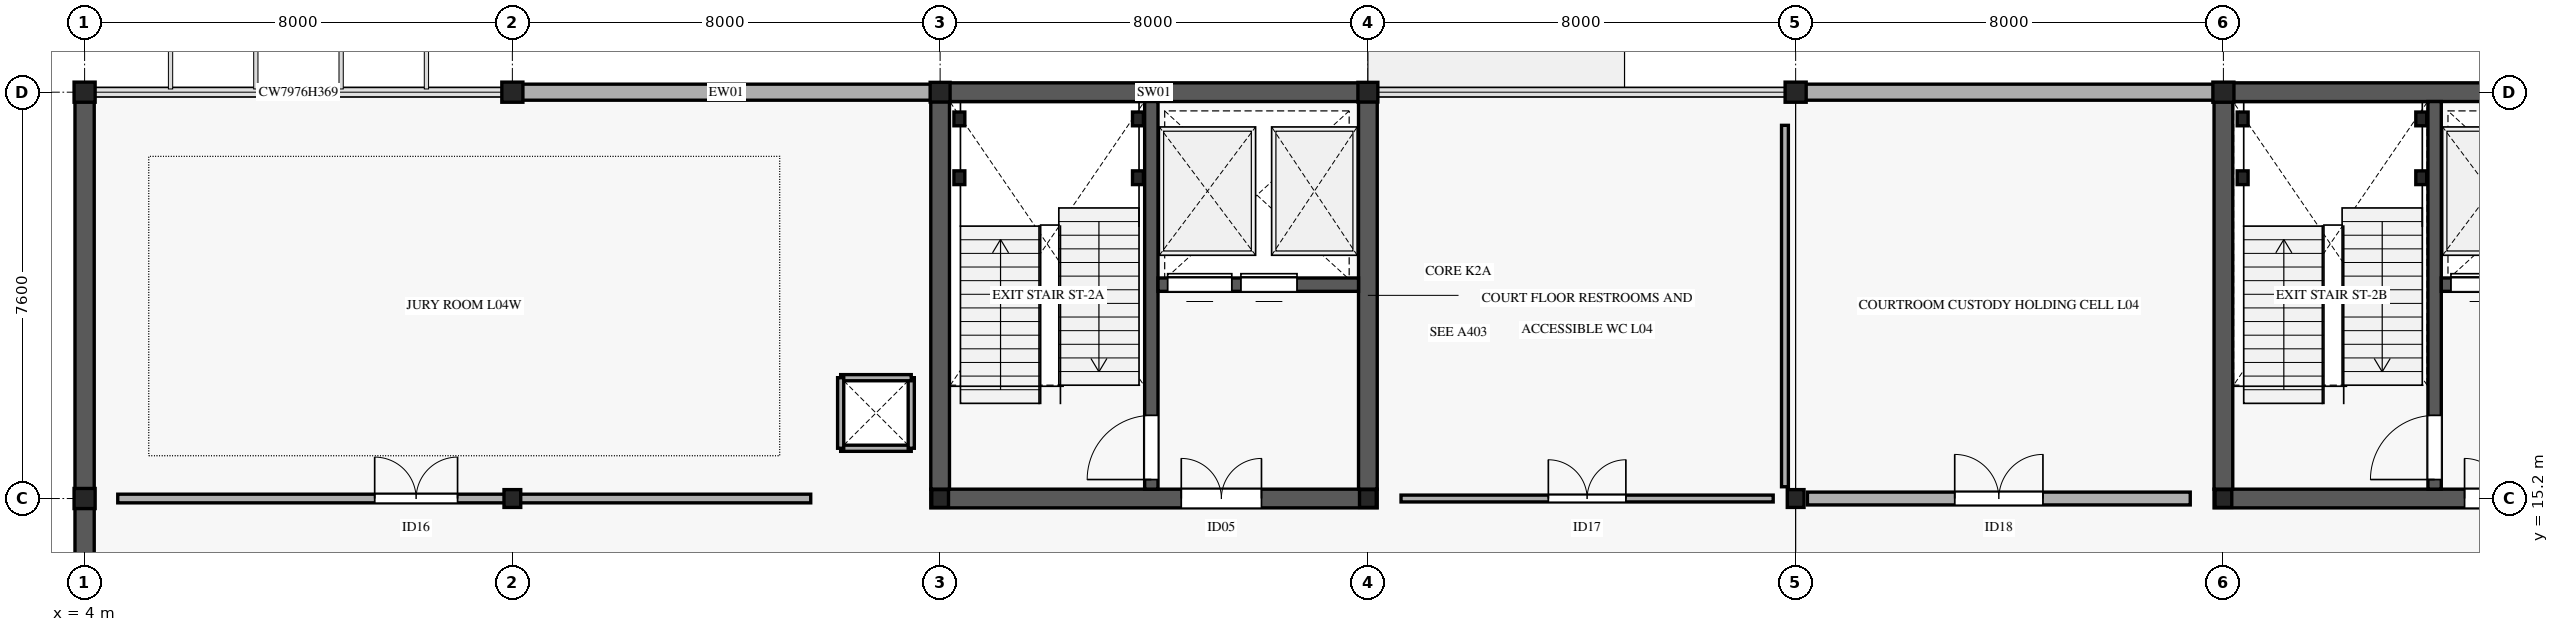
"""IFC4 building model, lengths in metres.
Left out: names, types, materials, properties, quantities, classifications, styles, units other than length and angle.
Written with IfcOpenShell. Run it as: python <this file> out.ifc"""

import sys

from ifc_helpers import new_model, si_unit, direction, frame, frame_2d, origin, origin_2d, place, context, subcontext, project, spatial, rectangle, i_section, extrude, element, fill, save


model = new_model("IFC4")
c1 = context("Model", 3, precision=1e-05, world=origin(), true_north=direction((0.0, 1.0)))
c2 = subcontext(c1, "Body", "Model", "MODEL_VIEW")
j1 = project(units=[si_unit("LENGTHUNIT", "METRE"), si_unit("PLANEANGLEUNIT", "RADIAN")], contexts=[c1])
p1 = place(None, origin())
s1 = spatial("IfcSite", under=j1, at=p1, CompositionType="ELEMENT")
p2 = place(p1, origin())
s2 = spatial("IfcBuilding", under=s1, at=p2, CompositionType="ELEMENT")
p3 = place(p2, frame((0.0, 0.0, 20.4)))
s3 = spatial("IfcBuildingStorey", under=s2, at=p3, CompositionType="ELEMENT", Elevation=20.4)
for number, where, z_axis, x_axis in (
    (1, (4.0, 15.2, 0.0), (0.0, 0.0, 1.0), (1.0, 0.0, 0.0)),
    (2, (4.0, 22.8, 0.0), (0.0, 0.0, 1.0), (1.0, 0.0, 0.0)),
):
    element("IfcColumn", number, at=place(p3, frame(where, z_axis=z_axis, x_axis=x_axis)), inside=s3, PredefinedType="COLUMN", context=c2, shape_type="SweptSolid", body=[
        extrude(i_section(OverallWidth=0.394, OverallDepth=0.376, WebThickness=0.017, FlangeThickness=0.028, FilletRadius=0.015, at=origin_2d()), origin(), (0.0, 0.0, 1.0), 4.595),
    ])
p4 = place(p3, frame((12.0, 15.2, 0.0), z_axis=(0.0, 0.0, 1.0), x_axis=(1.0, 0.0, 0.0)))
e3 = element("IfcColumn", 3, at=p4, inside=s3, PredefinedType="COLUMN", context=c2, shape_type="SweptSolid", body=[
    extrude(i_section(OverallWidth=0.313, OverallDepth=0.333, WebThickness=0.018, FlangeThickness=0.028, FilletRadius=0.015, at=origin_2d()), origin(), (0.0, 0.0, 1.0), 4.595),
])
p5 = place(p3, frame((12.0, 22.8, 0.0), z_axis=(0.0, 0.0, 1.0), x_axis=(1.0, 0.0, 0.0)))
e4 = element("IfcColumn", 4, at=p5, inside=s3, PredefinedType="COLUMN", context=c2, shape_type="SweptSolid", body=[
    extrude(i_section(OverallWidth=0.394, OverallDepth=0.376, WebThickness=0.017, FlangeThickness=0.028, FilletRadius=0.015, at=origin_2d()), origin(), (0.0, 0.0, 1.0), 4.595),
])
p6 = place(p3, frame((20.0, 15.2, 0.0), z_axis=(0.0, 0.0, 1.0), x_axis=(1.0, 0.0, 0.0)))
e5 = element("IfcColumn", 5, at=p6, inside=s3, PredefinedType="COLUMN", context=c2, shape_type="SweptSolid", body=[
    extrude(i_section(OverallWidth=0.313, OverallDepth=0.333, WebThickness=0.018, FlangeThickness=0.028, FilletRadius=0.015, at=origin_2d()), origin(), (0.0, 0.0, 1.0), 4.595),
])
p7 = place(p3, frame((20.0, 22.8, 0.0), z_axis=(0.0, 0.0, 1.0), x_axis=(1.0, 0.0, 0.0)))
e6 = element("IfcColumn", 6, at=p7, inside=s3, PredefinedType="COLUMN", context=c2, shape_type="SweptSolid", body=[
    extrude(i_section(OverallWidth=0.373, OverallDepth=0.368, WebThickness=0.015, FlangeThickness=0.024, FilletRadius=0.015, at=origin_2d()), origin(), (0.0, 0.0, 1.0), 4.595),
])
p8 = place(p3, frame((28.0, 15.2, 0.0), z_axis=(0.0, 0.0, 1.0), x_axis=(1.0, 0.0, 0.0)))
e7 = element("IfcColumn", 7, at=p8, inside=s3, PredefinedType="COLUMN", context=c2, shape_type="SweptSolid", body=[
    extrude(i_section(OverallWidth=0.313, OverallDepth=0.333, WebThickness=0.018, FlangeThickness=0.028, FilletRadius=0.015, at=origin_2d()), origin(), (0.0, 0.0, 1.0), 4.595),
])
p9 = place(p3, frame((28.0, 22.8, 0.0), z_axis=(0.0, 0.0, 1.0), x_axis=(1.0, 0.0, 0.0)))
e8 = element("IfcColumn", 8, at=p9, inside=s3, PredefinedType="COLUMN", context=c2, shape_type="SweptSolid", body=[
    extrude(i_section(OverallWidth=0.373, OverallDepth=0.368, WebThickness=0.015, FlangeThickness=0.024, FilletRadius=0.015, at=origin_2d()), origin(), (0.0, 0.0, 1.0), 4.595),
])
p10 = place(p3, frame((36.0, 15.2, 0.0), z_axis=(0.0, 0.0, 1.0), x_axis=(1.0, 0.0, 0.0)))
e9 = element("IfcColumn", 9, at=p10, inside=s3, PredefinedType="COLUMN", context=c2, shape_type="SweptSolid", body=[
    extrude(i_section(OverallWidth=0.313, OverallDepth=0.333, WebThickness=0.018, FlangeThickness=0.028, FilletRadius=0.015, at=origin_2d()), origin(), (0.0, 0.0, 1.0), 4.595),
])
p11 = place(p3, frame((36.0, 22.8, 0.0), z_axis=(0.0, 0.0, 1.0), x_axis=(1.0, 0.0, 0.0)))
e10 = element("IfcColumn", 10, at=p11, inside=s3, PredefinedType="COLUMN", context=c2, shape_type="SweptSolid", body=[
    extrude(i_section(OverallWidth=0.394, OverallDepth=0.376, WebThickness=0.017, FlangeThickness=0.028, FilletRadius=0.015, at=origin_2d()), origin(), (0.0, 0.0, 1.0), 4.595),
])
p12 = place(p3, frame((44.0, 15.2, 0.0), z_axis=(0.0, 0.0, 1.0), x_axis=(1.0, 0.0, 0.0)))
e11 = element("IfcColumn", 11, at=p12, inside=s3, PredefinedType="COLUMN", context=c2, shape_type="SweptSolid", body=[
    extrude(i_section(OverallWidth=0.313, OverallDepth=0.333, WebThickness=0.018, FlangeThickness=0.028, FilletRadius=0.015, at=origin_2d()), origin(), (0.0, 0.0, 1.0), 4.595),
])
p13 = place(p3, frame((44.0, 22.8, 0.0), z_axis=(0.0, 0.0, 1.0), x_axis=(1.0, 0.0, 0.0)))
e12 = element("IfcColumn", 12, at=p13, inside=s3, PredefinedType="COLUMN", context=c2, shape_type="SweptSolid", body=[
    extrude(i_section(OverallWidth=0.394, OverallDepth=0.376, WebThickness=0.017, FlangeThickness=0.028, FilletRadius=0.015, at=origin_2d()), origin(), (0.0, 0.0, 1.0), 4.595),
])
p14 = place(p3, frame((4.0, 7.58, 0.0), z_axis=(0.0, 0.0, 1.0), x_axis=(0.0, 1.0, 0.0)))
e13 = element("IfcWall", 13, at=p14, inside=s3, PredefinedType="STANDARD", context=c2, shape_type="SweptSolid", body=[
    extrude(rectangle(XDim=7.64, YDim=0.36, at=frame_2d((3.82, 0.0))), origin(), (0.0, 0.0, 1.0), 4.6),
])
p15 = place(p3, frame((4.0, 15.18, 0.0), z_axis=(0.0, 0.0, 1.0), x_axis=(0.0, 1.0, 0.0)))
e14 = element("IfcWall", 14, at=p15, inside=s3, PredefinedType="STANDARD", context=c2, shape_type="SweptSolid", body=[
    extrude(rectangle(XDim=7.64, YDim=0.36, at=frame_2d((3.82, 0.0))), origin(), (0.0, 0.0, 1.0), 4.6),
])
for number, where, z_axis, x_axis in (
    (15, (11.98, 22.8, 0.0), (0.0, 0.0, 1.0), (1.0, 0.0, 0.0)),
    (16, (35.98, 22.8, 0.0), (0.0, 0.0, 1.0), (1.0, 0.0, 0.0)),
):
    element("IfcWall", number, at=place(p3, frame(where, z_axis=z_axis, x_axis=x_axis)), inside=s3, PredefinedType="STANDARD", context=c2, shape_type="SweptSolid", body=[
        extrude(rectangle(XDim=8.04, YDim=0.3, at=frame_2d((4.02, 0.0))), origin(), (0.0, 0.0, 1.0), 3.66),
    ])
for number, where, z_axis, x_axis in (
    (17, (18.14, 16.14, 0.0), (0.0, 0.0, 1.0), (1.0, 0.0, 0.0)),
    (18, (19.46, 16.14, 0.0), (0.0, 0.0, 1.0), (0.0, 1.0, 0.0)),
    (19, (19.46, 17.46, 0.0), (0.0, 0.0, 1.0), (-1.0, 0.0, 0.0)),
    (20, (18.14, 17.46, 0.0), (0.0, 0.0, 1.0), (0.0, -1.0, 0.0)),
):
    element("IfcWall", number, at=place(p3, frame(where, z_axis=z_axis, x_axis=x_axis)), inside=s3, PredefinedType="PARTITIONING", context=c2, shape_type="SweptSolid", body=[
        extrude(rectangle(XDim=1.32, YDim=0.115, at=frame_2d((0.66, 0.0))), origin(), (0.0, 0.0, 1.0), 3.75),
    ])
p16 = place(p3, frame((19.825, 15.2, 0.0), z_axis=(0.0, 0.0, 1.0), x_axis=(1.0, 0.0, 0.0)))
e21 = element("IfcWall", 21, at=p16, inside=s3, PredefinedType="SHEAR", context=c2, shape_type="SweptSolid", body=[
    extrude(rectangle(XDim=8.35, YDim=0.35, at=frame_2d((4.175, 0.0))), origin(), (0.0, 0.0, 1.0), 4.59),
])
p17 = place(p16, frame((4.685, 0.0, 0.0)))
e22 = element("IfcOpeningElement", 22, at=p17, cuts=e21, PredefinedType="OPENING", context=c2, shape_type="SweptSolid", body=[
    extrude(rectangle(XDim=1.5, YDim=2.2, at=frame_2d((0.75, 1.1))), frame((0.0, 0.185, 0.0), z_axis=(0.0, -1.0, 0.0), x_axis=(1.0, 0.0, 0.0)), (0.0, 0.0, 1.0), 0.37),
])
p18 = place(p3, frame((19.825, 22.8, 0.0), z_axis=(0.0, 0.0, 1.0), x_axis=(1.0, 0.0, 0.0)))
e23 = element("IfcWall", 23, at=p18, inside=s3, PredefinedType="SHEAR", context=c2, shape_type="SweptSolid", body=[
    extrude(rectangle(XDim=8.35, YDim=0.35, at=frame_2d((4.175, 0.0))), origin(), (0.0, 0.0, 1.0), 4.59),
])
for number, where, z_axis, x_axis in (
    (24, (20.0, 15.375, 0.0), (0.0, 0.0, 1.0), (0.0, 1.0, 0.0)),
    (25, (28.0, 15.375, 0.0), (0.0, 0.0, 1.0), (0.0, 1.0, 0.0)),
):
    element("IfcWall", number, at=place(p3, frame(where, z_axis=z_axis, x_axis=x_axis)), inside=s3, PredefinedType="SHEAR", context=c2, shape_type="SweptSolid", body=[
        extrude(rectangle(XDim=7.25, YDim=0.35, at=frame_2d((3.625, 0.0))), origin(), (0.0, 0.0, 1.0), 4.59),
    ])
p19 = place(p3, frame((23.95, 15.375, 0.0), z_axis=(0.0, 0.0, 1.0), x_axis=(0.0, 1.0, 0.0)))
e26 = element("IfcWall", 26, at=p19, inside=s3, PredefinedType="SHEAR", context=c2, shape_type="SweptSolid", body=[
    extrude(rectangle(XDim=7.25, YDim=0.25, at=frame_2d((3.625, 0.0))), origin(), (0.0, 0.0, 1.0), 4.59),
])
p20 = place(p19, frame((0.18, 0.0, 0.0)))
e27 = element("IfcOpeningElement", 27, at=p20, cuts=e26, PredefinedType="OPENING", context=c2, shape_type="SweptSolid", body=[
    extrude(rectangle(XDim=1.2, YDim=2.2, at=frame_2d((0.6, 1.1))), frame((0.0, 0.135, 0.0), z_axis=(0.0, -1.0, 0.0), x_axis=(1.0, 0.0, 0.0)), (0.0, 0.0, 1.0), 0.27),
])
p21 = place(p3, frame((24.075, 19.2, 0.0), z_axis=(0.0, 0.0, 1.0), x_axis=(1.0, 0.0, 0.0)))
e28 = element("IfcWall", 28, at=p21, inside=s3, PredefinedType="SHEAR", context=c2, shape_type="SweptSolid", body=[
    extrude(rectangle(XDim=3.75, YDim=0.25, at=frame_2d((1.875, 0.0))), origin(), (0.0, 0.0, 1.0), 4.59),
])
p22 = place(p21, frame((0.18, 0.0, 0.0)))
e29 = element("IfcOpeningElement", 29, at=p22, cuts=e28, PredefinedType="OPENING", context=c2, shape_type="SweptSolid", body=[
    extrude(rectangle(XDim=1.2, YDim=2.2, at=frame_2d((0.6, 1.1))), frame((0.0, 0.135, 0.0), z_axis=(0.0, -1.0, 0.0), x_axis=(1.0, 0.0, 0.0)), (0.0, 0.0, 1.0), 0.27),
])
p23 = place(p21, frame((1.55, 0.0, 0.0)))
e30 = element("IfcOpeningElement", 30, at=p23, cuts=e28, PredefinedType="OPENING", context=c2, shape_type="SweptSolid", body=[
    extrude(rectangle(XDim=1.05, YDim=2.2, at=frame_2d((0.525, 1.1))), frame((0.0, 0.135, 0.0), z_axis=(0.0, -1.0, 0.0), x_axis=(1.0, 0.0, 0.0)), (0.0, 0.0, 1.0), 0.27),
])
for number, where, z_axis, x_axis in (
    (31, (20.36, 21.2, 0.0), (0.0, 0.0, 1.0), (1.0, 0.0, 0.0)),
    (32, (23.7, 21.2, 0.0), (0.0, 0.0, 1.0), (1.0, 0.0, 0.0)),
    (33, (20.36, 22.3, 0.0), (0.0, 0.0, 1.0), (1.0, 0.0, 0.0)),
    (34, (23.7, 22.3, 0.0), (0.0, 0.0, 1.0), (1.0, 0.0, 0.0)),
):
    element("IfcColumn", number, at=place(p3, frame(where, z_axis=z_axis, x_axis=x_axis)), inside=s3, PredefinedType="COLUMN", context=c2, shape_type="SweptSolid", body=[
        extrude(i_section(OverallWidth=0.204, OverallDepth=0.257, WebThickness=0.009, FlangeThickness=0.016, FilletRadius=0.013, at=origin_2d()), origin(), (0.0, 0.0, 1.0), 4.795),
    ])
p24 = place(p3, frame((43.825, 15.2, 0.0), z_axis=(0.0, 0.0, 1.0), x_axis=(1.0, 0.0, 0.0)))
e35 = element("IfcWall", 35, at=p24, inside=s3, PredefinedType="SHEAR", context=c2, shape_type="SweptSolid", body=[
    extrude(rectangle(XDim=8.35, YDim=0.35, at=frame_2d((4.175, 0.0))), origin(), (0.0, 0.0, 1.0), 4.59),
])
p25 = place(p24, frame((4.685, 0.0, 0.0)))
e36 = element("IfcOpeningElement", 36, at=p25, cuts=e35, PredefinedType="OPENING", context=c2, shape_type="SweptSolid", body=[
    extrude(rectangle(XDim=1.5, YDim=2.2, at=frame_2d((0.75, 1.1))), frame((0.0, 0.185, 0.0), z_axis=(0.0, -1.0, 0.0), x_axis=(1.0, 0.0, 0.0)), (0.0, 0.0, 1.0), 0.37),
])
p26 = place(p3, frame((43.825, 22.8, 0.0), z_axis=(0.0, 0.0, 1.0), x_axis=(1.0, 0.0, 0.0)))
e37 = element("IfcWall", 37, at=p26, inside=s3, PredefinedType="SHEAR", context=c2, shape_type="SweptSolid", body=[
    extrude(rectangle(XDim=8.35, YDim=0.35, at=frame_2d((4.175, 0.0))), origin(), (0.0, 0.0, 1.0), 4.59),
])
p27 = place(p3, frame((44.0, 15.375, 0.0), z_axis=(0.0, 0.0, 1.0), x_axis=(0.0, 1.0, 0.0)))
e38 = element("IfcWall", 38, at=p27, inside=s3, PredefinedType="SHEAR", context=c2, shape_type="SweptSolid", body=[
    extrude(rectangle(XDim=7.25, YDim=0.35, at=frame_2d((3.625, 0.0))), origin(), (0.0, 0.0, 1.0), 4.59),
])
p28 = place(p3, frame((47.95, 15.375, 0.0), z_axis=(0.0, 0.0, 1.0), x_axis=(0.0, 1.0, 0.0)))
e39 = element("IfcWall", 39, at=p28, inside=s3, PredefinedType="SHEAR", context=c2, shape_type="SweptSolid", body=[
    extrude(rectangle(XDim=7.25, YDim=0.25, at=frame_2d((3.625, 0.0))), origin(), (0.0, 0.0, 1.0), 4.59),
])
p29 = place(p28, frame((0.18, 0.0, 0.0)))
e40 = element("IfcOpeningElement", 40, at=p29, cuts=e39, PredefinedType="OPENING", context=c2, shape_type="SweptSolid", body=[
    extrude(rectangle(XDim=1.2, YDim=2.2, at=frame_2d((0.6, 1.1))), frame((0.0, 0.135, 0.0), z_axis=(0.0, -1.0, 0.0), x_axis=(1.0, 0.0, 0.0)), (0.0, 0.0, 1.0), 0.27),
])
p30 = place(p3, frame((48.075, 19.2, 0.0), z_axis=(0.0, 0.0, 1.0), x_axis=(1.0, 0.0, 0.0)))
e41 = element("IfcWall", 41, at=p30, inside=s3, PredefinedType="SHEAR", context=c2, shape_type="SweptSolid", body=[
    extrude(rectangle(XDim=3.75, YDim=0.25, at=frame_2d((1.875, 0.0))), origin(), (0.0, 0.0, 1.0), 4.59),
])
p31 = place(p30, frame((0.18, 0.0, 0.0)))
e42 = element("IfcOpeningElement", 42, at=p31, cuts=e41, PredefinedType="OPENING", context=c2, shape_type="SweptSolid", body=[
    extrude(rectangle(XDim=1.2, YDim=2.2, at=frame_2d((0.6, 1.1))), frame((0.0, 0.135, 0.0), z_axis=(0.0, -1.0, 0.0), x_axis=(1.0, 0.0, 0.0)), (0.0, 0.0, 1.0), 0.27),
])
p32 = place(p30, frame((1.85, 0.0, 0.0)))
e43 = element("IfcOpeningElement", 43, at=p32, cuts=e41, PredefinedType="OPENING", context=c2, shape_type="SweptSolid", body=[
    extrude(rectangle(XDim=1.35, YDim=2.2, at=frame_2d((0.675, 1.1))), frame((0.0, 0.135, 0.0), z_axis=(0.0, -1.0, 0.0), x_axis=(1.0, 0.0, 0.0)), (0.0, 0.0, 1.0), 0.27),
])
for number, where, z_axis, x_axis in (
    (44, (44.36, 21.2, 0.0), (0.0, 0.0, 1.0), (1.0, 0.0, 0.0)),
    (45, (47.7, 21.2, 0.0), (0.0, 0.0, 1.0), (1.0, 0.0, 0.0)),
    (46, (44.36, 22.3, 0.0), (0.0, 0.0, 1.0), (1.0, 0.0, 0.0)),
    (47, (47.7, 22.3, 0.0), (0.0, 0.0, 1.0), (1.0, 0.0, 0.0)),
):
    element("IfcColumn", number, at=place(p3, frame(where, z_axis=z_axis, x_axis=x_axis)), inside=s3, PredefinedType="COLUMN", context=c2, shape_type="SweptSolid", body=[
        extrude(i_section(OverallWidth=0.204, OverallDepth=0.257, WebThickness=0.009, FlangeThickness=0.016, FilletRadius=0.013, at=origin_2d()), origin(), (0.0, 0.0, 1.0), 4.795),
    ])
p33 = place(p3, frame((4.62, 15.2, 0.0), z_axis=(0.0, 0.0, 1.0), x_axis=(1.0, 0.0, 0.0)))
e48 = element("IfcWall", 48, at=p33, inside=s3, PredefinedType="PARTITIONING", context=c2, shape_type="SweptSolid", body=[
    extrude(rectangle(XDim=12.96, YDim=0.162, at=frame_2d((6.48, 0.0))), origin(), (0.0, 0.0, 1.0), 3.45),
])
p34 = place(p33, frame((4.805, 0.0, 0.0)))
e49 = element("IfcOpeningElement", 49, at=p34, cuts=e48, PredefinedType="OPENING", context=c2, shape_type="SweptSolid", body=[
    extrude(rectangle(XDim=1.55, YDim=2.3, at=frame_2d((0.775, 1.15))), frame((0.0, 0.091, 0.0), z_axis=(0.0, -1.0, 0.0), x_axis=(1.0, 0.0, 0.0)), (0.0, 0.0, 1.0), 0.182),
])
p35 = place(p3, frame((28.62, 15.2, 0.0), z_axis=(0.0, 0.0, 1.0), x_axis=(1.0, 0.0, 0.0)))
e50 = element("IfcWall", 50, at=p35, inside=s3, PredefinedType="PARTITIONING", context=c2, shape_type="SweptSolid", body=[
    extrude(rectangle(XDim=6.96, YDim=0.128, at=frame_2d((3.48, 0.0))), origin(), (0.0, 0.0, 1.0), 3.45),
])
p36 = place(p35, frame((2.755, 0.0, 0.0)))
e51 = element("IfcOpeningElement", 51, at=p36, cuts=e50, PredefinedType="OPENING", context=c2, shape_type="SweptSolid", body=[
    extrude(rectangle(XDim=1.45, YDim=2.25, at=frame_2d((0.725, 1.125))), frame((0.0, 0.074, 0.0), z_axis=(0.0, -1.0, 0.0), x_axis=(1.0, 0.0, 0.0)), (0.0, 0.0, 1.0), 0.148),
])
p37 = place(p3, frame((35.8, 15.42, 0.0), z_axis=(0.0, 0.0, 1.0), x_axis=(0.0, 1.0, 0.0)))
e52 = element("IfcWall", 52, at=p37, inside=s3, PredefinedType="PARTITIONING", context=c2, shape_type="SweptSolid", body=[
    extrude(rectangle(XDim=6.76, YDim=0.128, at=frame_2d((3.38, 0.0))), origin(), (0.0, 0.0, 1.0), 3.45),
])
p38 = place(p3, frame((36.22, 15.2, 0.0), z_axis=(0.0, 0.0, 1.0), x_axis=(1.0, 0.0, 0.0)))
e53 = element("IfcWall", 53, at=p38, inside=s3, PredefinedType="PARTITIONING", context=c2, shape_type="SweptSolid", body=[
    extrude(rectangle(XDim=7.16, YDim=0.24, at=frame_2d((3.58, 0.0))), origin(), (0.0, 0.0, 1.0), 3.45),
])
p39 = place(p38, frame((2.755, 0.0, 0.0)))
e54 = element("IfcOpeningElement", 54, at=p39, cuts=e53, PredefinedType="OPENING", context=c2, shape_type="SweptSolid", body=[
    extrude(rectangle(XDim=1.65, YDim=2.3, at=frame_2d((0.825, 1.15))), frame((0.0, 0.13, 0.0), z_axis=(0.0, -1.0, 0.0), x_axis=(1.0, 0.0, 0.0)), (0.0, 0.0, 1.0), 0.26),
])
p40 = place(p20, origin())
e55 = element("IfcDoor", 55, at=p40, inside=s3, OperationType="SINGLE_SWING_LEFT", PredefinedType="DOOR", context=c2, shape_type="SweptSolid", body=[
    extrude(rectangle(XDim=1.2, YDim=2.2, at=frame_2d((0.6, 1.1))), frame((0.0, 0.025, 0.0), z_axis=(0.0, -1.0, 0.0), x_axis=(1.0, 0.0, 0.0)), (0.0, 0.0, 1.0), 0.05),
])
fill(e27, e55)
p41 = place(p17, origin())
e56 = element("IfcDoor", 56, at=p41, inside=s3, OperationType="DOUBLE_DOOR_SINGLE_SWING", PredefinedType="DOOR", context=c2, shape_type="SweptSolid", body=[
    extrude(rectangle(XDim=1.5, YDim=2.2, at=frame_2d((0.75, 1.1))), frame((0.0, 0.025, 0.0), z_axis=(0.0, -1.0, 0.0), x_axis=(1.0, 0.0, 0.0)), (0.0, 0.0, 1.0), 0.05),
])
fill(e22, e56)
p42 = place(p22, origin())
e57 = element("IfcDoor", 57, at=p42, inside=s3, OperationType="SLIDING_TO_LEFT", PredefinedType="DOOR", context=c2, shape_type="SweptSolid", body=[
    extrude(rectangle(XDim=1.2, YDim=2.2, at=frame_2d((0.6, 1.1))), frame((0.0, 0.025, 0.0), z_axis=(0.0, -1.0, 0.0), x_axis=(1.0, 0.0, 0.0)), (0.0, 0.0, 1.0), 0.05),
])
fill(e29, e57)
p43 = place(p23, origin())
e58 = element("IfcDoor", 58, at=p43, inside=s3, OperationType="SLIDING_TO_RIGHT", PredefinedType="DOOR", context=c2, shape_type="SweptSolid", body=[
    extrude(rectangle(XDim=1.05, YDim=2.2, at=frame_2d((0.525, 1.1))), frame((0.0, 0.025, 0.0), z_axis=(0.0, -1.0, 0.0), x_axis=(1.0, 0.0, 0.0)), (0.0, 0.0, 1.0), 0.05),
])
fill(e30, e58)
p44 = place(p29, origin())
e59 = element("IfcDoor", 59, at=p44, inside=s3, OperationType="SINGLE_SWING_LEFT", PredefinedType="DOOR", context=c2, shape_type="SweptSolid", body=[
    extrude(rectangle(XDim=1.2, YDim=2.2, at=frame_2d((0.6, 1.1))), frame((0.0, 0.025, 0.0), z_axis=(0.0, -1.0, 0.0), x_axis=(1.0, 0.0, 0.0)), (0.0, 0.0, 1.0), 0.05),
])
fill(e40, e59)
p45 = place(p25, origin())
e60 = element("IfcDoor", 60, at=p45, inside=s3, OperationType="DOUBLE_DOOR_SINGLE_SWING", PredefinedType="DOOR", context=c2, shape_type="SweptSolid", body=[
    extrude(rectangle(XDim=1.5, YDim=2.2, at=frame_2d((0.75, 1.1))), frame((0.0, 0.025, 0.0), z_axis=(0.0, -1.0, 0.0), x_axis=(1.0, 0.0, 0.0)), (0.0, 0.0, 1.0), 0.05),
])
fill(e36, e60)
p46 = place(p31, origin())
e61 = element("IfcDoor", 61, at=p46, inside=s3, OperationType="SLIDING_TO_LEFT", PredefinedType="DOOR", context=c2, shape_type="SweptSolid", body=[
    extrude(rectangle(XDim=1.2, YDim=2.2, at=frame_2d((0.6, 1.1))), frame((0.0, 0.025, 0.0), z_axis=(0.0, -1.0, 0.0), x_axis=(1.0, 0.0, 0.0)), (0.0, 0.0, 1.0), 0.05),
])
fill(e42, e61)
p47 = place(p34, origin())
e62 = element("IfcDoor", 62, at=p47, inside=s3, OperationType="DOUBLE_DOOR_SINGLE_SWING", PredefinedType="DOOR", context=c2, shape_type="SweptSolid", body=[
    extrude(rectangle(XDim=1.55, YDim=2.3, at=frame_2d((0.775, 1.15))), frame((0.0, 0.025, 0.0), z_axis=(0.0, -1.0, 0.0), x_axis=(1.0, 0.0, 0.0)), (0.0, 0.0, 1.0), 0.05),
])
fill(e49, e62)
p48 = place(p36, origin())
e63 = element("IfcDoor", 63, at=p48, inside=s3, OperationType="DOUBLE_DOOR_SINGLE_SWING", PredefinedType="DOOR", context=c2, shape_type="SweptSolid", body=[
    extrude(rectangle(XDim=1.45, YDim=2.25, at=frame_2d((0.725, 1.125))), frame((0.0, 0.025, 0.0), z_axis=(0.0, -1.0, 0.0), x_axis=(1.0, 0.0, 0.0)), (0.0, 0.0, 1.0), 0.05),
])
fill(e51, e63)
p49 = place(p39, origin())
e64 = element("IfcDoor", 64, at=p49, inside=s3, OperationType="DOUBLE_DOOR_SINGLE_SWING", PredefinedType="DOOR", context=c2, shape_type="SweptSolid", body=[
    extrude(rectangle(XDim=1.65, YDim=2.3, at=frame_2d((0.825, 1.15))), frame((0.0, 0.025, 0.0), z_axis=(0.0, -1.0, 0.0), x_axis=(1.0, 0.0, 0.0)), (0.0, 0.0, 1.0), 0.05),
])
fill(e54, e64)
save(model, sys.argv[1])
